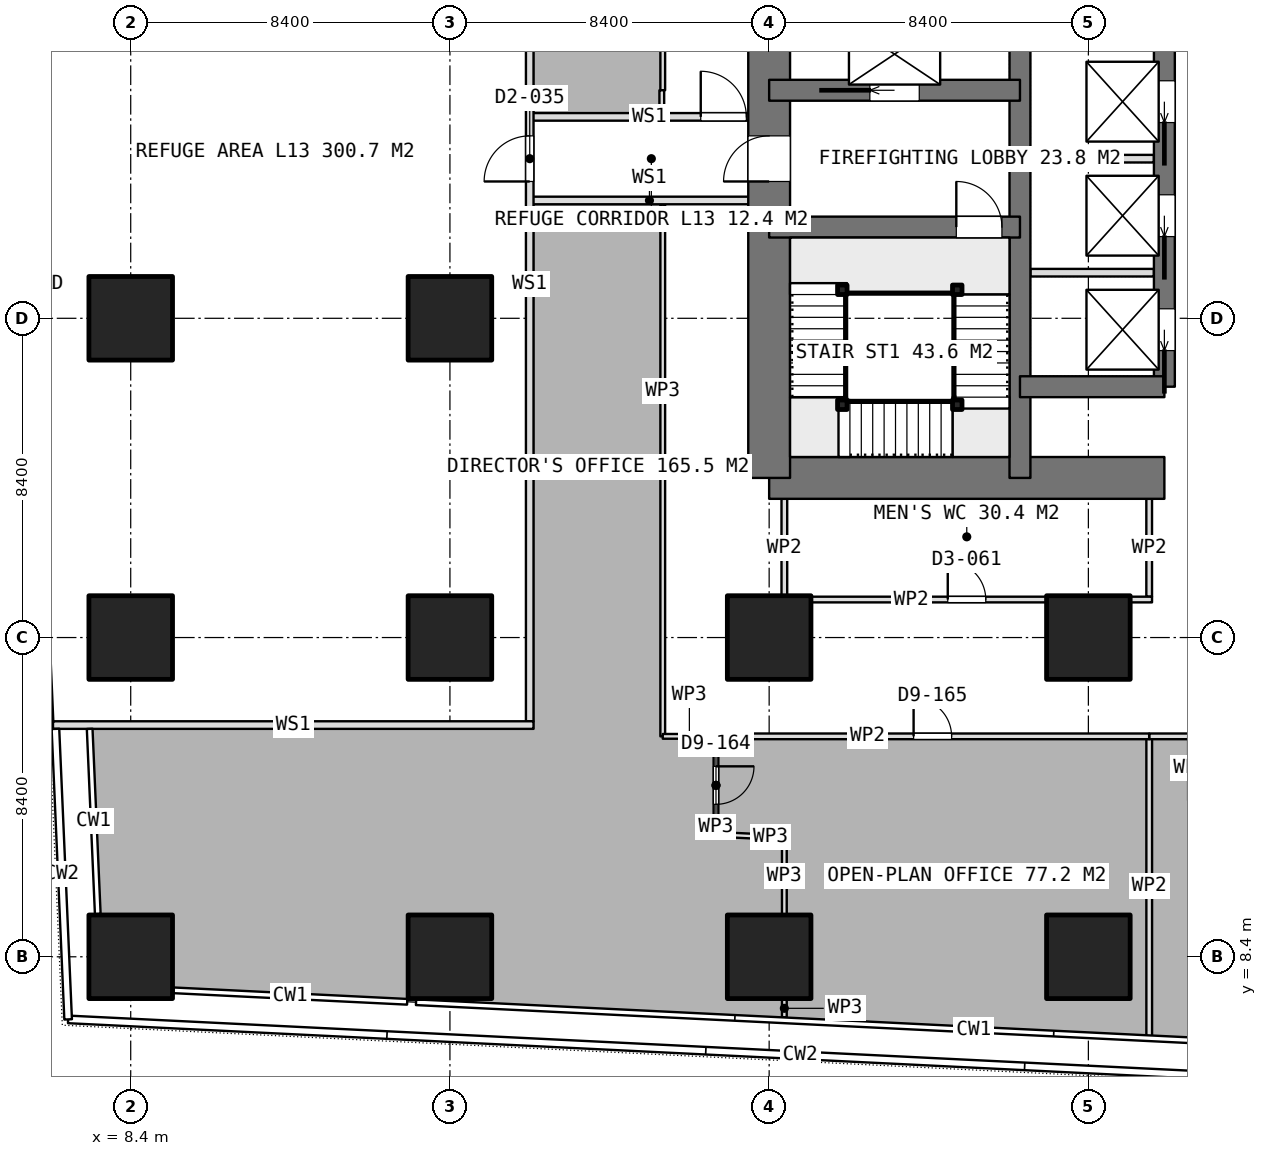
"""IFC4 building model, lengths in metres.
Left out: names, types, materials, properties, quantities, classifications, styles, units other than length and angle.
Written with IfcOpenShell. Run it as: python <this file> out.ifc"""

import sys

from ifc_helpers import new_model, si_unit, direction, frame, frame_2d, origin, origin_2d, place, context, subcontext, project, spatial, rectangle, extrude, element, fill, save


model = new_model("IFC4")
c1 = context("Model", 3, precision=1e-05, world=origin(), true_north=direction((0.0, 1.0)))
c2 = subcontext(c1, "Body", "Model", "MODEL_VIEW")
j1 = project(units=[si_unit("LENGTHUNIT", "METRE"), si_unit("PLANEANGLEUNIT", "RADIAN")], contexts=[c1])
p1 = place(None, origin())
s1 = spatial("IfcSite", under=j1, at=p1, CompositionType="ELEMENT")
p2 = place(p1, origin())
s2 = spatial("IfcBuilding", under=s1, at=p2, CompositionType="ELEMENT")
p3 = place(p2, frame((0.0, 0.0, 55.4)))
s3 = spatial("IfcBuildingStorey", under=s2, at=p3, CompositionType="ELEMENT", Elevation=55.4)
p4 = place(p3, frame((25.2, 21.0, 0.0), z_axis=(0.0, 0.0, 1.0), x_axis=(1.0, 0.0, 0.0)))
e1 = element("IfcWall", 1, at=p4, inside=s3, PredefinedType="SHEAR", context=c2, shape_type="SweptSolid", body=[
    extrude(rectangle(XDim=10.4, YDim=1.1, at=frame_2d((5.2, 0.0))), origin(), (0.0, 0.0, 1.0), 3.75),
])
p5 = place(p3, frame((25.2, 21.0, 0.0), z_axis=(0.0, 0.0, 1.0), x_axis=(0.0, 1.0, 0.0)))
e2 = element("IfcWall", 2, at=p5, inside=s3, PredefinedType="SHEAR", context=c2, shape_type="SweptSolid", body=[
    extrude(rectangle(XDim=25.2, YDim=1.1, at=frame_2d((12.6, 0.0))), origin(), (0.0, 0.0, 1.0), 3.75),
])
p6 = place(p5, frame((7.8, 0.0, 0.0)))
e3 = element("IfcOpeningElement", 3, at=p6, cuts=e2, PredefinedType="OPENING", context=c2, shape_type="SweptSolid", body=[
    extrude(rectangle(XDim=1.2, YDim=2.1, at=frame_2d((0.6, 1.05))), frame((0.0, 0.56, 0.0), z_axis=(0.0, -1.0, 0.0), x_axis=(1.0, 0.0, 0.0)), (0.0, 0.0, 1.0), 1.12),
])
p7 = place(p5, frame((14.25, 0.0, 0.0)))
e4 = element("IfcOpeningElement", 4, at=p7, cuts=e2, PredefinedType="OPENING", context=c2, shape_type="SweptSolid", body=[
    extrude(rectangle(XDim=0.9, YDim=2.1, at=frame_2d((0.45, 1.05))), frame((0.0, 0.56, 0.0), z_axis=(0.0, -1.0, 0.0), x_axis=(1.0, 0.0, 0.0)), (0.0, 0.0, 1.0), 1.12),
])
p8 = place(p5, frame((16.85, 0.0, 0.0)))
e5 = element("IfcOpeningElement", 5, at=p8, cuts=e2, PredefinedType="OPENING", context=c2, shape_type="SweptSolid", body=[
    extrude(rectangle(XDim=0.9, YDim=2.1, at=frame_2d((0.45, 1.05))), frame((0.0, 0.56, 0.0), z_axis=(0.0, -1.0, 0.0), x_axis=(1.0, 0.0, 0.0)), (0.0, 0.0, 1.0), 1.12),
])
p9 = place(p5, frame((19.075, 0.0, 0.0)))
e6 = element("IfcOpeningElement", 6, at=p9, cuts=e2, PredefinedType="OPENING", context=c2, shape_type="SweptSolid", body=[
    extrude(rectangle(XDim=1.2, YDim=2.1, at=frame_2d((0.6, 1.05))), frame((0.0, 0.56, 0.0), z_axis=(0.0, -1.0, 0.0), x_axis=(1.0, 0.0, 0.0)), (0.0, 0.0, 1.0), 1.12),
])
p10 = place(p3, frame((31.8, 21.0, 0.0), z_axis=(0.0, 0.0, 1.0), x_axis=(0.0, 1.0, 0.0)))
e7 = element("IfcWall", 7, at=p10, inside=s3, PredefinedType="SHEAR", context=c2, shape_type="SweptSolid", body=[
    extrude(rectangle(XDim=25.2, YDim=0.55, at=frame_2d((12.6, 0.0))), origin(), (0.0, 0.0, 1.0), 3.75),
])
p11 = place(p3, frame((35.6, 23.4, 0.0), z_axis=(0.0, 0.0, 1.0), x_axis=(0.0, 1.0, 0.0)))
e8 = element("IfcWall", 8, at=p11, inside=s3, PredefinedType="SHEAR", context=c2, shape_type="SweptSolid", body=[
    extrude(rectangle(XDim=18.0, YDim=0.55, at=frame_2d((9.0, 0.0))), origin(), (0.0, 0.0, 1.0), 3.75),
])
p12 = place(p11, frame((0.95, 0.0, 0.0)))
e9 = element("IfcOpeningElement", 9, at=p12, cuts=e8, PredefinedType="OPENING", context=c2, shape_type="SweptSolid", body=[
    extrude(rectangle(XDim=1.1, YDim=2.1, at=frame_2d((0.55, 1.05))), frame((0.0, 0.285, 0.0), z_axis=(0.0, -1.0, 0.0), x_axis=(1.0, 0.0, 0.0)), (0.0, 0.0, 1.0), 0.57),
])
p13 = place(p11, frame((3.95, 0.0, 0.0)))
e10 = element("IfcOpeningElement", 10, at=p13, cuts=e8, PredefinedType="OPENING", context=c2, shape_type="SweptSolid", body=[
    extrude(rectangle(XDim=1.1, YDim=2.1, at=frame_2d((0.55, 1.05))), frame((0.0, 0.285, 0.0), z_axis=(0.0, -1.0, 0.0), x_axis=(1.0, 0.0, 0.0)), (0.0, 0.0, 1.0), 0.57),
])
p14 = place(p11, frame((6.95, 0.0, 0.0)))
e11 = element("IfcOpeningElement", 11, at=p14, cuts=e8, PredefinedType="OPENING", context=c2, shape_type="SweptSolid", body=[
    extrude(rectangle(XDim=1.1, YDim=2.1, at=frame_2d((0.55, 1.05))), frame((0.0, 0.285, 0.0), z_axis=(0.0, -1.0, 0.0), x_axis=(1.0, 0.0, 0.0)), (0.0, 0.0, 1.0), 0.57),
])
p15 = place(p11, frame((9.95, 0.0, 0.0)))
e12 = element("IfcOpeningElement", 12, at=p15, cuts=e8, PredefinedType="OPENING", context=c2, shape_type="SweptSolid", body=[
    extrude(rectangle(XDim=1.1, YDim=2.1, at=frame_2d((0.55, 1.05))), frame((0.0, 0.285, 0.0), z_axis=(0.0, -1.0, 0.0), x_axis=(1.0, 0.0, 0.0)), (0.0, 0.0, 1.0), 0.57),
])
p16 = place(p11, frame((12.95, 0.0, 0.0)))
e13 = element("IfcOpeningElement", 13, at=p16, cuts=e8, PredefinedType="OPENING", context=c2, shape_type="SweptSolid", body=[
    extrude(rectangle(XDim=1.1, YDim=2.1, at=frame_2d((0.55, 1.05))), frame((0.0, 0.285, 0.0), z_axis=(0.0, -1.0, 0.0), x_axis=(1.0, 0.0, 0.0)), (0.0, 0.0, 1.0), 0.57),
])
p17 = place(p11, frame((15.95, 0.0, 0.0)))
e14 = element("IfcOpeningElement", 14, at=p17, cuts=e8, PredefinedType="OPENING", context=c2, shape_type="SweptSolid", body=[
    extrude(rectangle(XDim=1.1, YDim=2.1, at=frame_2d((0.55, 1.05))), frame((0.0, 0.285, 0.0), z_axis=(0.0, -1.0, 0.0), x_axis=(1.0, 0.0, 0.0)), (0.0, 0.0, 1.0), 0.57),
])
p18 = place(p3, frame((31.8, 23.4, 0.0), z_axis=(0.0, 0.0, 1.0), x_axis=(1.0, 0.0, 0.0)))
e15 = element("IfcWall", 15, at=p18, inside=s3, PredefinedType="SHEAR", context=c2, shape_type="SweptSolid", body=[
    extrude(rectangle(XDim=3.8, YDim=0.55, at=frame_2d((1.9, 0.0))), origin(), (0.0, 0.0, 1.0), 3.75),
])
p19 = place(p3, frame((25.2, 27.6, 0.0), z_axis=(0.0, 0.0, 1.0), x_axis=(1.0, 0.0, 0.0)))
e16 = element("IfcWall", 16, at=p19, inside=s3, PredefinedType="SHEAR", context=c2, shape_type="SweptSolid", body=[
    extrude(rectangle(XDim=6.6, YDim=0.55, at=frame_2d((3.3, 0.0))), origin(), (0.0, 0.0, 1.0), 3.75),
])
p20 = place(p19, frame((4.925, 0.0, 0.0)))
e17 = element("IfcOpeningElement", 17, at=p20, cuts=e16, PredefinedType="OPENING", context=c2, shape_type="SweptSolid", body=[
    extrude(rectangle(XDim=1.2, YDim=2.1, at=frame_2d((0.6, 1.05))), frame((0.0, 0.285, 0.0), z_axis=(0.0, -1.0, 0.0), x_axis=(1.0, 0.0, 0.0)), (0.0, 0.0, 1.0), 0.57),
])
p21 = place(p3, frame((25.2, 31.2, 0.0), z_axis=(0.0, 0.0, 1.0), x_axis=(1.0, 0.0, 0.0)))
e18 = element("IfcWall", 18, at=p21, inside=s3, PredefinedType="SHEAR", context=c2, shape_type="SweptSolid", body=[
    extrude(rectangle(XDim=6.6, YDim=0.55, at=frame_2d((3.3, 0.0))), origin(), (0.0, 0.0, 1.0), 3.75),
])
p22 = place(p21, frame((2.65, 0.0, 0.0)))
e19 = element("IfcOpeningElement", 19, at=p22, cuts=e18, PredefinedType="OPENING", context=c2, shape_type="SweptSolid", body=[
    extrude(rectangle(XDim=1.3, YDim=2.1, at=frame_2d((0.65, 1.05))), frame((0.0, 0.285, 0.0), z_axis=(0.0, -1.0, 0.0), x_axis=(1.0, 0.0, 0.0)), (0.0, 0.0, 1.0), 0.57),
])
for number, where, z_axis, x_axis in (
    (20, (8.4, 8.4, 0.0), (0.0, 0.0, 1.0), (1.0, 0.0, 0.0)),
    (21, (8.4, 16.8, 0.0), (0.0, 0.0, 1.0), (1.0, 0.0, 0.0)),
    (22, (8.4, 25.2, 0.0), (0.0, 0.0, 1.0), (1.0, 0.0, 0.0)),
    (23, (16.8, 8.4, 0.0), (0.0, 0.0, 1.0), (1.0, 0.0, 0.0)),
    (24, (16.8, 16.8, 0.0), (0.0, 0.0, 1.0), (1.0, 0.0, 0.0)),
    (25, (16.8, 25.2, 0.0), (0.0, 0.0, 1.0), (1.0, 0.0, 0.0)),
    (26, (25.2, 8.4, 0.0), (0.0, 0.0, 1.0), (1.0, 0.0, 0.0)),
    (27, (25.2, 16.8, 0.0), (0.0, 0.0, 1.0), (1.0, 0.0, 0.0)),
    (28, (33.6, 8.4, 0.0), (0.0, 0.0, 1.0), (1.0, 0.0, 0.0)),
    (29, (33.6, 16.8, 0.0), (0.0, 0.0, 1.0), (1.0, 0.0, 0.0)),
):
    element("IfcColumn", number, at=place(p3, frame(where, z_axis=z_axis, x_axis=x_axis)), inside=s3, PredefinedType="COLUMN", context=c2, shape_type="SweptSolid", body=[
        extrude(rectangle(XDim=2.2, YDim=2.2, at=origin_2d()), origin(), (0.0, 0.0, 1.0), 3.75),
    ])
for number, where, z_axis, x_axis in (
    (30, (32.075, 26.4, 0.0), (0.0, 0.0, 1.0), (1.0, 0.0, 0.0)),
    (31, (32.075, 29.4, 0.0), (0.0, 0.0, 1.0), (1.0, 0.0, 0.0)),
):
    element("IfcWall", number, at=place(p3, frame(where, z_axis=z_axis, x_axis=x_axis)), inside=s3, PredefinedType="PARTITIONING", context=c2, shape_type="SweptSolid", body=[
        extrude(rectangle(XDim=3.25, YDim=0.2, at=frame_2d((1.625, 0.0))), origin(), (0.0, 0.0, 1.0), 3.5),
    ])
p23 = place(p3, frame((25.525, 17.8, 0.0), z_axis=(0.0, 0.0, 1.0), x_axis=(1.0, 0.0, 0.0)))
e32 = element("IfcWall", 32, at=p23, inside=s3, PredefinedType="PARTITIONING", context=c2, shape_type="SweptSolid", body=[
    extrude(rectangle(XDim=9.75, YDim=0.15, at=frame_2d((4.875, 0.0))), origin(), (0.0, 0.0, 1.0), 3.5),
])
p24 = place(p23, frame((4.375, 0.0, 0.0)))
e33 = element("IfcOpeningElement", 33, at=p24, cuts=e32, PredefinedType="OPENING", context=c2, shape_type="SweptSolid", body=[
    extrude(rectangle(XDim=1.0, YDim=2.1, at=frame_2d((0.5, 1.05))), frame((0.0, 0.085, 0.0), z_axis=(0.0, -1.0, 0.0), x_axis=(1.0, 0.0, 0.0)), (0.0, 0.0, 1.0), 0.17),
])
for number, where, z_axis, x_axis in (
    (34, (25.6, 17.875, 0.0), (0.0, 0.0, 1.0), (0.0, 1.0, 0.0)),
    (35, (35.2, 17.875, 0.0), (0.0, 0.0, 1.0), (0.0, 1.0, 0.0)),
):
    element("IfcWall", number, at=place(p3, frame(where, z_axis=z_axis, x_axis=x_axis)), inside=s3, PredefinedType="PARTITIONING", context=c2, shape_type="SweptSolid", body=[
        extrude(rectangle(XDim=2.575, YDim=0.15, at=frame_2d((1.288, 0.0))), origin(), (0.0, 0.0, 1.0), 3.5),
    ])
p25 = place(p3, frame((35.201, 6.307, 0.0), z_axis=(0.0, 0.0, 1.0), x_axis=(0.0, 1.0, 0.0)))
e36 = element("IfcWall", 36, at=p25, inside=s3, PredefinedType="PARTITIONING", context=c2, shape_type="SweptSolid", body=[
    extrude(rectangle(XDim=7.893, YDim=0.15, at=frame_2d((3.947, 0.0))), origin(), (0.0, 0.0, 1.0), 3.5),
])
p26 = place(p3, frame((35.201, 14.2, 0.0), z_axis=(0.0, 0.0, 1.0), x_axis=(1.0, 0.0, 0.0)))
e37 = element("IfcWall", 37, at=p26, inside=s3, PredefinedType="PARTITIONING", context=c2, shape_type="SweptSolid", body=[
    extrude(rectangle(XDim=1.099, YDim=0.15, at=frame_2d((0.55, 0.0))), origin(), (0.0, 0.0, 1.0), 3.5),
])
p27 = place(p3, frame((22.4, 42.631, 0.0), z_axis=(0.0, 0.0, 1.0), x_axis=(0.0, -1.0, 0.0)))
e38 = element("IfcWall", 38, at=p27, inside=s3, PredefinedType="PARTITIONING", context=c2, shape_type="SweptSolid", body=[
    extrude(rectangle(XDim=11.431, YDim=0.125, at=frame_2d((5.716, 0.0))), origin(), (0.0, 0.0, 1.0), 3.5),
])
p28 = place(p3, frame((22.375, 31.2, 0.0), z_axis=(0.0, 0.0, 1.0), x_axis=(0.0, -1.0, 0.0)))
e39 = element("IfcWall", 39, at=p28, inside=s3, PredefinedType="PARTITIONING", context=c2, shape_type="SweptSolid", body=[
    extrude(rectangle(XDim=0.589, YDim=0.125, at=frame_2d((0.294, 0.0))), origin(), (0.0, 0.0, 1.0), 3.5),
])
p29 = place(p3, frame((22.4, 28.189, 0.0), z_axis=(0.0, 0.0, 1.0), x_axis=(0.0, -1.0, 0.0)))
e40 = element("IfcWall", 40, at=p29, inside=s3, PredefinedType="PARTITIONING", context=c2, shape_type="SweptSolid", body=[
    extrude(rectangle(XDim=13.989, YDim=0.125, at=frame_2d((6.995, 0.0))), origin(), (0.0, 0.0, 1.0), 3.5),
])
p30 = place(p3, frame((22.4, 14.2, 0.0), z_axis=(0.0, 0.0, 1.0), x_axis=(1.0, 0.0, 0.0)))
e41 = element("IfcWall", 41, at=p30, inside=s3, PredefinedType="PARTITIONING", context=c2, shape_type="SweptSolid", body=[
    extrude(rectangle(XDim=1.401, YDim=0.125, at=frame_2d((0.701, 0.0))), origin(), (0.0, 0.0, 1.0), 3.5),
])
p31 = place(p3, frame((23.801, 14.2, 0.0), z_axis=(0.0, 0.0, 1.0), x_axis=(0.0, -1.0, 0.0)))
e42 = element("IfcWall", 42, at=p31, inside=s3, PredefinedType="PARTITIONING", context=c2, shape_type="SweptSolid", body=[
    extrude(rectangle(XDim=2.578, YDim=0.125, at=frame_2d((1.289, 0.0))), origin(), (0.0, 0.0, 1.0), 3.5),
])
p32 = place(p31, frame((0.789, 0.0, 0.0)))
e43 = element("IfcOpeningElement", 43, at=p32, cuts=e42, PredefinedType="OPENING", context=c2, shape_type="SweptSolid", body=[
    extrude(rectangle(XDim=1.0, YDim=2.1, at=frame_2d((0.5, 1.05))), frame((0.0, 0.073, 0.0), z_axis=(0.0, -1.0, 0.0), x_axis=(1.0, 0.0, 0.0)), (0.0, 0.0, 1.0), 0.145),
])
p33 = place(p3, frame((23.801, 11.622, 0.0), z_axis=(0.0, 0.0, 1.0), x_axis=(0.998802194098, -0.048930328684, 0.0)))
e44 = element("IfcWall", 44, at=p33, inside=s3, PredefinedType="PARTITIONING", context=c2, shape_type="SweptSolid", body=[
    extrude(rectangle(XDim=1.801, YDim=0.125, at=frame_2d((0.901, 0.0))), origin(), (0.0, 0.0, 1.0), 3.5),
])
p34 = place(p3, frame((25.6, 11.534, 0.0), z_axis=(0.0, 0.0, 1.0), x_axis=(0.0, -1.0, 0.0)))
e45 = element("IfcWall", 45, at=p34, inside=s3, PredefinedType="PARTITIONING", context=c2, shape_type="SweptSolid", body=[
    extrude(rectangle(XDim=2.014, YDim=0.125, at=frame_2d((1.007, 0.0))), origin(), (0.0, 0.0, 1.0), 3.5),
])
p35 = place(p3, frame((25.6, 7.28, 0.0), z_axis=(0.0, 0.0, 1.0), x_axis=(0.0, -1.0, 0.0)))
e46 = element("IfcWall", 46, at=p35, inside=s3, PredefinedType="PARTITIONING", context=c2, shape_type="SweptSolid", body=[
    extrude(rectangle(XDim=0.472, YDim=0.125, at=frame_2d((0.236, 0.0))), origin(), (0.0, 0.0, 1.0), 3.5),
])
p36 = place(p3, frame((23.801, 14.2, 0.0), z_axis=(0.0, 0.0, 1.0), x_axis=(1.0, 0.0, 0.0)))
e47 = element("IfcWall", 47, at=p36, inside=s3, PredefinedType="PARTITIONING", context=c2, shape_type="SweptSolid", body=[
    extrude(rectangle(XDim=11.399, YDim=0.15, at=frame_2d((5.699, 0.0))), origin(), (0.0, 0.0, 1.0), 3.5),
])
p37 = place(p36, frame((5.2, 0.0, 0.0)))
e48 = element("IfcOpeningElement", 48, at=p37, cuts=e47, PredefinedType="OPENING", context=c2, shape_type="SweptSolid", body=[
    extrude(rectangle(XDim=1.0, YDim=2.1, at=frame_2d((0.5, 1.05))), frame((0.0, 0.085, 0.0), z_axis=(0.0, -1.0, 0.0), x_axis=(1.0, 0.0, 0.0)), (0.0, 0.0, 1.0), 0.17),
])
for number, where, z_axis, x_axis in (
    (49, (30.15, 25.95, 0.0), (0.0, 0.0, 1.0), (1.0, 0.0, 0.0)),
    (50, (30.15, 22.925, 0.0), (0.0, 0.0, 1.0), (1.0, 0.0, 0.0)),
    (51, (27.125, 22.925, 0.0), (0.0, 0.0, 1.0), (1.0, 0.0, 0.0)),
    (52, (27.125, 25.95, 0.0), (0.0, 0.0, 1.0), (1.0, 0.0, 0.0)),
):
    element("IfcColumn", number, at=place(p3, frame(where, z_axis=z_axis, x_axis=x_axis)), inside=s3, PredefinedType="COLUMN", context=c2, shape_type="SweptSolid", body=[
        extrude(rectangle(XDim=0.25, YDim=0.25, at=origin_2d()), origin(), (0.0, 0.0, 1.0), 3.75),
    ])
p38 = place(p3, frame((18.9, 14.597, 0.0), z_axis=(0.0, 0.0, 1.0), x_axis=(0.0, 1.0, 0.0)))
e53 = element("IfcWall", 53, at=p38, inside=s3, PredefinedType="PARTITIONING", context=c2, shape_type="SweptSolid", body=[
    extrude(rectangle(XDim=23.033, YDim=0.2, at=frame_2d((11.517, 0.0))), origin(), (0.0, 0.0, 1.0), 3.5),
])
p39 = place(p38, frame((14.203, 0.0, 0.0)))
e54 = element("IfcOpeningElement", 54, at=p39, cuts=e53, PredefinedType="OPENING", context=c2, shape_type="SweptSolid", body=[
    extrude(rectangle(XDim=1.2, YDim=2.1, at=frame_2d((0.6, 1.05))), frame((0.0, 0.11, 0.0), z_axis=(0.0, -1.0, 0.0), x_axis=(1.0, 0.0, 0.0)), (0.0, 0.0, 1.0), 0.22),
])
p40 = place(p3, frame((6.355, 14.497, 0.0), z_axis=(0.0, 0.0, 1.0), x_axis=(1.0, 0.0, 0.0)))
e55 = element("IfcWall", 55, at=p40, inside=s3, PredefinedType="PARTITIONING", context=c2, shape_type="SweptSolid", body=[
    extrude(rectangle(XDim=12.645, YDim=0.2, at=frame_2d((6.323, 0.0))), origin(), (0.0, 0.0, 1.0), 3.5),
])
p41 = place(p3, frame((18.9, 30.5, 0.0), z_axis=(0.0, 0.0, 1.0), x_axis=(1.0, 0.0, 0.0)))
e56 = element("IfcWall", 56, at=p41, inside=s3, PredefinedType="PARTITIONING", context=c2, shape_type="SweptSolid", body=[
    extrude(rectangle(XDim=6.3, YDim=0.2, at=frame_2d((3.15, 0.0))), origin(), (0.0, 0.0, 1.0), 3.5),
])
p42 = place(p41, frame((4.5, 0.0, 0.0)))
e57 = element("IfcOpeningElement", 57, at=p42, cuts=e56, PredefinedType="OPENING", context=c2, shape_type="SweptSolid", body=[
    extrude(rectangle(XDim=1.2, YDim=2.1, at=frame_2d((0.6, 1.05))), frame((0.0, 0.11, 0.0), z_axis=(0.0, -1.0, 0.0), x_axis=(1.0, 0.0, 0.0)), (0.0, 0.0, 1.0), 0.22),
])
p43 = place(p3, frame((18.9, 28.3, 0.0), z_axis=(0.0, 0.0, 1.0), x_axis=(1.0, 0.0, 0.0)))
e58 = element("IfcWall", 58, at=p43, inside=s3, PredefinedType="PARTITIONING", context=c2, shape_type="SweptSolid", body=[
    extrude(rectangle(XDim=6.3, YDim=0.2, at=frame_2d((3.15, 0.0))), origin(), (0.0, 0.0, 1.0), 3.5),
])
p44 = place(p6, origin())
e59 = element("IfcDoor", 59, at=p44, inside=s3, OperationType="SINGLE_SWING_LEFT", PredefinedType="DOOR", context=c2, shape_type="SweptSolid", body=[
    extrude(rectangle(XDim=1.2, YDim=2.1, at=frame_2d((0.6, 1.05))), frame((0.0, 0.025, 0.0), z_axis=(0.0, -1.0, 0.0), x_axis=(1.0, 0.0, 0.0)), (0.0, 0.0, 1.0), 0.05),
])
fill(e3, e59)
p45 = place(p12, origin())
e60 = element("IfcDoor", 60, at=p45, inside=s3, OperationType="SLIDING_TO_LEFT", PredefinedType="USERDEFINED", context=c2, shape_type="SweptSolid", body=[
    extrude(rectangle(XDim=1.1, YDim=2.1, at=frame_2d((0.55, 1.05))), frame((0.0, 0.025, 0.0), z_axis=(0.0, -1.0, 0.0), x_axis=(1.0, 0.0, 0.0)), (0.0, 0.0, 1.0), 0.05),
])
fill(e9, e60)
p46 = place(p13, origin())
e61 = element("IfcDoor", 61, at=p46, inside=s3, OperationType="SLIDING_TO_LEFT", PredefinedType="USERDEFINED", context=c2, shape_type="SweptSolid", body=[
    extrude(rectangle(XDim=1.1, YDim=2.1, at=frame_2d((0.55, 1.05))), frame((0.0, 0.025, 0.0), z_axis=(0.0, -1.0, 0.0), x_axis=(1.0, 0.0, 0.0)), (0.0, 0.0, 1.0), 0.05),
])
fill(e10, e61)
p47 = place(p14, origin())
e62 = element("IfcDoor", 62, at=p47, inside=s3, OperationType="SLIDING_TO_LEFT", PredefinedType="USERDEFINED", context=c2, shape_type="SweptSolid", body=[
    extrude(rectangle(XDim=1.1, YDim=2.1, at=frame_2d((0.55, 1.05))), frame((0.0, 0.025, 0.0), z_axis=(0.0, -1.0, 0.0), x_axis=(1.0, 0.0, 0.0)), (0.0, 0.0, 1.0), 0.05),
])
fill(e11, e62)
p48 = place(p22, origin())
e63 = element("IfcDoor", 63, at=p48, inside=s3, OperationType="SLIDING_TO_LEFT", PredefinedType="USERDEFINED", context=c2, shape_type="SweptSolid", body=[
    extrude(rectangle(XDim=1.3, YDim=2.1, at=frame_2d((0.65, 1.05))), frame((0.0, 0.025, 0.0), z_axis=(0.0, -1.0, 0.0), x_axis=(1.0, 0.0, 0.0)), (0.0, 0.0, 1.0), 0.05),
])
fill(e19, e63)
p49 = place(p24, origin())
e64 = element("IfcDoor", 64, at=p49, inside=s3, OperationType="SINGLE_SWING_LEFT", PredefinedType="DOOR", context=c2, shape_type="SweptSolid", body=[
    extrude(rectangle(XDim=1.0, YDim=2.1, at=frame_2d((0.5, 1.05))), frame((0.0, 0.025, 0.0), z_axis=(0.0, -1.0, 0.0), x_axis=(1.0, 0.0, 0.0)), (0.0, 0.0, 1.0), 0.05),
])
fill(e33, e64)
p50 = place(p32, origin())
e65 = element("IfcDoor", 65, at=p50, inside=s3, OperationType="SINGLE_SWING_LEFT", PredefinedType="DOOR", context=c2, shape_type="SweptSolid", body=[
    extrude(rectangle(XDim=1.0, YDim=2.1, at=frame_2d((0.5, 1.05))), frame((0.0, 0.025, 0.0), z_axis=(0.0, -1.0, 0.0), x_axis=(1.0, 0.0, 0.0)), (0.0, 0.0, 1.0), 0.05),
])
fill(e43, e65)
p51 = place(p37, origin())
e66 = element("IfcDoor", 66, at=p51, inside=s3, OperationType="SINGLE_SWING_LEFT", PredefinedType="DOOR", context=c2, shape_type="SweptSolid", body=[
    extrude(rectangle(XDim=1.0, YDim=2.1, at=frame_2d((0.5, 1.05))), frame((0.0, 0.025, 0.0), z_axis=(0.0, -1.0, 0.0), x_axis=(1.0, 0.0, 0.0)), (0.0, 0.0, 1.0), 0.05),
])
fill(e48, e66)
p52 = place(p20, origin())
e67 = element("IfcDoor", 67, at=p52, inside=s3, OperationType="SINGLE_SWING_RIGHT", PredefinedType="DOOR", context=c2, shape_type="SweptSolid", body=[
    extrude(rectangle(XDim=1.2, YDim=2.1, at=frame_2d((0.6, 1.05))), frame((0.0, 0.025, 0.0), z_axis=(0.0, -1.0, 0.0), x_axis=(1.0, 0.0, 0.0)), (0.0, 0.0, 1.0), 0.05),
])
fill(e17, e67)
p53 = place(p39, origin())
e68 = element("IfcDoor", 68, at=p53, inside=s3, OperationType="SINGLE_SWING_LEFT", PredefinedType="DOOR", context=c2, shape_type="SweptSolid", body=[
    extrude(rectangle(XDim=1.2, YDim=2.1, at=frame_2d((0.6, 1.05))), frame((0.0, 0.025, 0.0), z_axis=(0.0, -1.0, 0.0), x_axis=(1.0, 0.0, 0.0)), (0.0, 0.0, 1.0), 0.05),
])
fill(e54, e68)
p54 = place(p42, origin())
e69 = element("IfcDoor", 69, at=p54, inside=s3, OperationType="SINGLE_SWING_LEFT", PredefinedType="DOOR", context=c2, shape_type="SweptSolid", body=[
    extrude(rectangle(XDim=1.2, YDim=2.1, at=frame_2d((0.6, 1.05))), frame((0.0, 0.025, 0.0), z_axis=(0.0, -1.0, 0.0), x_axis=(1.0, 0.0, 0.0)), (0.0, 0.0, 1.0), 0.05),
])
fill(e57, e69)
save(model, sys.argv[1])
